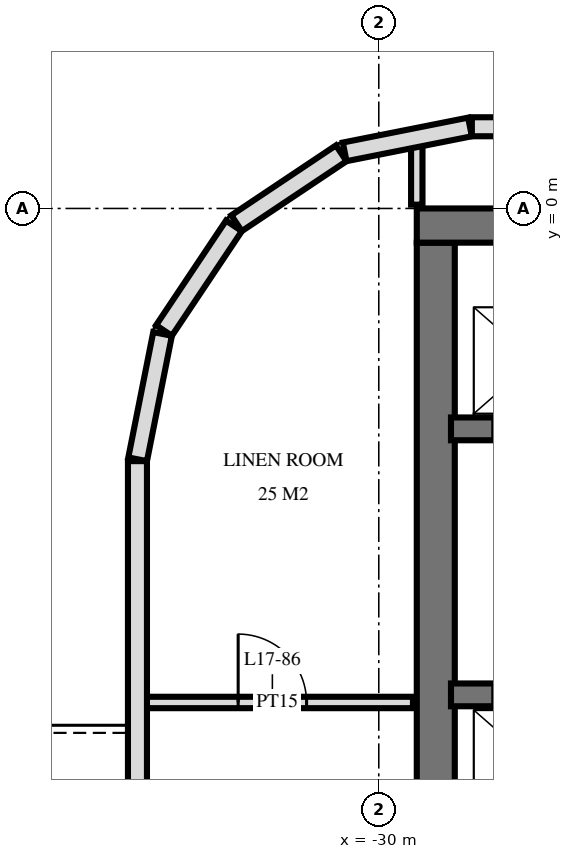
"""IFC4 building model, lengths in metres.
Left out: names, types, materials, properties, quantities, classifications, styles, units other than length and angle.
Written with IfcOpenShell. Run it as: python <this file> out.ifc"""

import sys

from ifc_helpers import new_model, si_unit, direction, frame, frame_2d, origin, place, context, subcontext, project, spatial, rectangle, extrude, element, fill, save


model = new_model("IFC4")
c1 = context("Model", 3, precision=1e-05, world=origin(), true_north=direction((0.0, 1.0)))
c2 = subcontext(c1, "Body", "Model", "MODEL_VIEW")
j1 = project(units=[si_unit("LENGTHUNIT", "METRE"), si_unit("PLANEANGLEUNIT", "RADIAN")], contexts=[c1])
p1 = place(None, origin())
s1 = spatial("IfcSite", under=j1, at=p1, CompositionType="ELEMENT")
p2 = place(p1, origin())
s2 = spatial("IfcBuilding", under=s1, at=p2, CompositionType="ELEMENT")
p3 = place(p2, frame((0.0, 0.0, 70.8)))
s3 = spatial("IfcBuildingStorey", under=s2, at=p3, CompositionType="ELEMENT", Elevation=70.8)
p4 = place(p3, frame((-29.5, -0.225, 0.0), z_axis=(0.0, 0.0, 1.0), x_axis=(1.0, 0.0, 0.0)))
e1 = element("IfcWall", 1, at=p4, inside=s3, PredefinedType="SHEAR", context=c2, shape_type="SweptSolid", body=[
    extrude(rectangle(XDim=19.5, YDim=0.45, at=frame_2d((9.75, 0.0))), origin(), (0.0, 0.0, 1.0), 3.6),
])
p5 = place(p3, frame((-29.25, -14.55, 0.0), z_axis=(0.0, 0.0, 1.0), x_axis=(0.0, 1.0, 0.0)))
e2 = element("IfcWall", 2, at=p5, inside=s3, PredefinedType="SHEAR", context=c2, shape_type="SweptSolid", body=[
    extrude(rectangle(XDim=14.1, YDim=0.5, at=frame_2d((7.05, 0.0))), origin(), (0.0, 0.0, 1.0), 3.6),
])
p6 = place(p3, frame((-29.05, -2.9, 0.0), z_axis=(0.0, 0.0, 1.0), x_axis=(1.0, 0.0, 0.0)))
e3 = element("IfcWall", 3, at=p6, inside=s3, PredefinedType="SHEAR", context=c2, shape_type="SweptSolid", body=[
    extrude(rectangle(XDim=18.7, YDim=0.3, at=frame_2d((9.35, 0.0))), origin(), (0.0, 0.0, 1.0), 3.6),
])
p7 = place(p6, frame((2.95, 0.0, 0.0)))
e4 = element("IfcOpeningElement", 4, at=p7, cuts=e3, PredefinedType="OPENING", context=c2, shape_type="SweptSolid", body=[
    extrude(rectangle(XDim=1.1, YDim=2.1, at=frame_2d((0.55, 1.05))), frame((0.0, 0.16, 0.0), z_axis=(0.0, -1.0, 0.0), x_axis=(1.0, 0.0, 0.0)), (0.0, 0.0, 1.0), 0.32),
])
p8 = place(p6, frame((0.55, 0.0, 0.0)))
e5 = element("IfcOpeningElement", 5, at=p8, cuts=e3, PredefinedType="OPENING", context=c2, shape_type="SweptSolid", body=[
    extrude(rectangle(XDim=1.1, YDim=2.1, at=frame_2d((0.55, 1.05))), frame((0.0, 0.16, 0.0), z_axis=(0.0, -1.0, 0.0), x_axis=(1.0, 0.0, 0.0)), (0.0, 0.0, 1.0), 0.32),
])
p9 = place(p6, frame((11.613, 0.0, 0.0)))
e6 = element("IfcOpeningElement", 6, at=p9, cuts=e3, PredefinedType="OPENING", context=c2, shape_type="SweptSolid", body=[
    extrude(rectangle(XDim=0.9, YDim=2.1, at=frame_2d((0.45, 1.05))), frame((0.0, 0.16, 0.0), z_axis=(0.0, -1.0, 0.0), x_axis=(1.0, 0.0, 0.0)), (0.0, 0.0, 1.0), 0.32),
])
p10 = place(p6, frame((10.188, 0.0, 0.0)))
e7 = element("IfcOpeningElement", 7, at=p10, cuts=e3, PredefinedType="OPENING", context=c2, shape_type="SweptSolid", body=[
    extrude(rectangle(XDim=0.9, YDim=2.1, at=frame_2d((0.45, 1.05))), frame((0.0, 0.16, 0.0), z_axis=(0.0, -1.0, 0.0), x_axis=(1.0, 0.0, 0.0)), (0.0, 0.0, 1.0), 0.32),
])
p11 = place(p6, frame((17.562, 0.0, 0.0)))
e8 = element("IfcOpeningElement", 8, at=p11, cuts=e3, PredefinedType="OPENING", context=c2, shape_type="SweptSolid", body=[
    extrude(rectangle(XDim=1.0, YDim=2.1, at=frame_2d((0.5, 1.05))), frame((0.0, 0.16, 0.0), z_axis=(0.0, -1.0, 0.0), x_axis=(1.0, 0.0, 0.0)), (0.0, 0.0, 1.0), 0.32),
])
p12 = place(p6, frame((16.137, 0.0, 0.0)))
e9 = element("IfcOpeningElement", 9, at=p12, cuts=e3, PredefinedType="OPENING", context=c2, shape_type="SweptSolid", body=[
    extrude(rectangle(XDim=1.0, YDim=2.1, at=frame_2d((0.5, 1.05))), frame((0.0, 0.16, 0.0), z_axis=(0.0, -1.0, 0.0), x_axis=(1.0, 0.0, 0.0)), (0.0, 0.0, 1.0), 0.32),
])
p13 = place(p6, frame((13.85, 0.0, 0.0)))
e10 = element("IfcOpeningElement", 10, at=p13, cuts=e3, PredefinedType="OPENING", context=c2, shape_type="SweptSolid", body=[
    extrude(rectangle(XDim=1.0, YDim=2.1, at=frame_2d((0.5, 1.05))), frame((0.0, 0.16, 0.0), z_axis=(0.0, -1.0, 0.0), x_axis=(1.0, 0.0, 0.0)), (0.0, 0.0, 1.0), 0.32),
])
p14 = place(p6, frame((5.6, 0.0, 0.0)))
e11 = element("IfcOpeningElement", 11, at=p14, cuts=e3, PredefinedType="OPENING", context=c2, shape_type="SweptSolid", body=[
    extrude(rectangle(XDim=1.0, YDim=2.1, at=frame_2d((0.5, 1.05))), frame((0.0, 0.16, 0.0), z_axis=(0.0, -1.0, 0.0), x_axis=(1.0, 0.0, 0.0)), (0.0, 0.0, 1.0), 0.32),
])
p15 = place(p3, frame((-29.05, -6.4, 0.0), z_axis=(0.0, 0.0, 1.0), x_axis=(1.0, 0.0, 0.0)))
e12 = element("IfcWall", 12, at=p15, inside=s3, PredefinedType="SHEAR", context=c2, shape_type="SweptSolid", body=[
    extrude(rectangle(XDim=18.7, YDim=0.3, at=frame_2d((9.35, 0.0))), origin(), (0.0, 0.0, 1.0), 3.6),
])
p16 = place(p15, frame((2.95, 0.0, 0.0)))
e13 = element("IfcOpeningElement", 13, at=p16, cuts=e12, PredefinedType="OPENING", context=c2, shape_type="SweptSolid", body=[
    extrude(rectangle(XDim=1.1, YDim=2.1, at=frame_2d((0.55, 1.05))), frame((0.0, 0.16, 0.0), z_axis=(0.0, -1.0, 0.0), x_axis=(1.0, 0.0, 0.0)), (0.0, 0.0, 1.0), 0.32),
])
p17 = place(p15, frame((0.55, 0.0, 0.0)))
e14 = element("IfcOpeningElement", 14, at=p17, cuts=e12, PredefinedType="OPENING", context=c2, shape_type="SweptSolid", body=[
    extrude(rectangle(XDim=1.1, YDim=2.1, at=frame_2d((0.55, 1.05))), frame((0.0, 0.16, 0.0), z_axis=(0.0, -1.0, 0.0), x_axis=(1.0, 0.0, 0.0)), (0.0, 0.0, 1.0), 0.32),
])
p18 = place(p15, frame((10.8, 0.0, 0.0)))
e15 = element("IfcOpeningElement", 15, at=p18, cuts=e12, PredefinedType="OPENING", context=c2, shape_type="SweptSolid", body=[
    extrude(rectangle(XDim=1.1, YDim=2.1, at=frame_2d((0.55, 1.05))), frame((0.0, 0.16, 0.0), z_axis=(0.0, -1.0, 0.0), x_axis=(1.0, 0.0, 0.0)), (0.0, 0.0, 1.0), 0.32),
])
p19 = place(p15, frame((5.6, 0.0, 0.0)))
e16 = element("IfcOpeningElement", 16, at=p19, cuts=e12, PredefinedType="OPENING", context=c2, shape_type="SweptSolid", body=[
    extrude(rectangle(XDim=1.0, YDim=2.1, at=frame_2d((0.5, 1.05))), frame((0.0, 0.16, 0.0), z_axis=(0.0, -1.0, 0.0), x_axis=(1.0, 0.0, 0.0)), (0.0, 0.0, 1.0), 0.32),
])
p20 = place(p3, frame((28.775, 1.075, 0.0), z_axis=(0.0, 0.0, 1.0), x_axis=(-1.0, 0.0, 0.0)))
e17 = element("IfcWall", 17, at=p20, inside=s3, PredefinedType="SOLIDWALL", context=c2, shape_type="SweptSolid", body=[
    extrude(rectangle(XDim=57.551, YDim=0.25, at=frame_2d((28.775, 0.0))), origin(), (0.0, 0.0, 1.0), 3.32),
])
p21 = place(p20, frame((35.575, 0.0, 0.3)))
e18 = element("IfcOpeningElement", 18, at=p21, cuts=e17, PredefinedType="OPENING", context=c2, shape_type="SweptSolid", body=[
    extrude(rectangle(XDim=2.4, YDim=2.1, at=frame_2d((1.2, 1.05))), frame((0.0, 0.135, 0.0), z_axis=(0.0, -1.0, 0.0), x_axis=(1.0, 0.0, 0.0)), (0.0, 0.0, 1.0), 0.27),
])
p22 = place(p3, frame((-28.8, 1.073, 0.0), z_axis=(0.0, 0.0, 1.0), x_axis=(-0.980803419081, -0.194999110559, 0.0)))
e19 = element("IfcWall", 19, at=p22, inside=s3, PredefinedType="SOLIDWALL", context=c2, shape_type="SweptSolid", body=[
    extrude(rectangle(XDim=1.681, YDim=0.25, at=frame_2d((0.841, 0.0))), origin(), (0.0, 0.0, 1.0), 3.32),
])
for number, where, z_axis, x_axis in (
    (20, (-30.494, 0.726, 0.0), (0.0, 0.0, 1.0), (-0.831, -0.556, 0.0)),
    (21, (-31.906, -0.229, 0.0), (0.0, 0.0, 1.0), (-0.556, -0.831, 0.0)),
):
    element("IfcWall", number, at=place(p3, frame(where, z_axis=z_axis, x_axis=x_axis)), inside=s3, PredefinedType="SOLIDWALL", context=c2, shape_type="SweptSolid", body=[
        extrude(rectangle(XDim=1.656, YDim=0.25, at=frame_2d((0.828, 0.0))), origin(), (0.0, 0.0, 1.0), 3.32),
    ])
p23 = place(p3, frame((-32.844, -1.651, 0.0), z_axis=(0.0, 0.0, 1.0), x_axis=(-0.19513878023, -0.980775640221, 0.0)))
e22 = element("IfcWall", 22, at=p23, inside=s3, PredefinedType="SOLIDWALL", context=c2, shape_type="SweptSolid", body=[
    extrude(rectangle(XDim=1.681, YDim=0.25, at=frame_2d((0.841, 0.0))), origin(), (0.0, 0.0, 1.0), 3.32),
])
p24 = place(p3, frame((-33.175, -3.325, 0.0), z_axis=(0.0, 0.0, 1.0), x_axis=(0.0, -1.0, 0.0)))
e23 = element("IfcWall", 23, at=p24, inside=s3, PredefinedType="SOLIDWALL", context=c2, shape_type="SweptSolid", body=[
    extrude(rectangle(XDim=21.551, YDim=0.25, at=frame_2d((10.775, 0.0))), origin(), (0.0, 0.0, 1.0), 3.32),
])
p25 = place(p24, frame((6.65, 0.0, 0.0)))
e24 = element("IfcOpeningElement", 24, at=p25, cuts=e23, PredefinedType="OPENING", context=c2, shape_type="SweptSolid", body=[
    extrude(rectangle(XDim=1.8, YDim=2.4, at=frame_2d((0.9, 1.2))), frame((0.0, 0.135, 0.0), z_axis=(0.0, -1.0, 0.0), x_axis=(1.0, 0.0, 0.0)), (0.0, 0.0, 1.0), 0.27),
])
p26 = place(p24, frame((12.575, 0.0, 0.3)))
e25 = element("IfcOpeningElement", 25, at=p26, cuts=e23, PredefinedType="OPENING", context=c2, shape_type="SweptSolid", body=[
    extrude(rectangle(XDim=1.2, YDim=2.1, at=frame_2d((0.6, 1.05))), frame((0.0, 0.135, 0.0), z_axis=(0.0, -1.0, 0.0), x_axis=(1.0, 0.0, 0.0)), (0.0, 0.0, 1.0), 0.27),
])
p27 = place(p24, frame((15.275, 0.0, 0.0)))
e26 = element("IfcOpeningElement", 26, at=p27, cuts=e23, PredefinedType="OPENING", context=c2, shape_type="SweptSolid", body=[
    extrude(rectangle(XDim=1.8, YDim=2.4, at=frame_2d((0.9, 1.2))), frame((0.0, 0.135, 0.0), z_axis=(0.0, -1.0, 0.0), x_axis=(1.0, 0.0, 0.0)), (0.0, 0.0, 1.0), 0.27),
])
p28 = place(p24, frame((18.875, 0.0, 0.0)))
e27 = element("IfcOpeningElement", 27, at=p28, cuts=e23, PredefinedType="OPENING", context=c2, shape_type="SweptSolid", body=[
    extrude(rectangle(XDim=1.8, YDim=2.4, at=frame_2d((0.9, 1.2))), frame((0.0, 0.135, 0.0), z_axis=(0.0, -1.0, 0.0), x_axis=(1.0, 0.0, 0.0)), (0.0, 0.0, 1.0), 0.27),
])
p29 = place(p3, frame((-29.5, 0.05, 0.0), z_axis=(0.0, 0.0, 1.0), x_axis=(0.0, 1.0, 0.0)))
e28 = element("IfcWall", 28, at=p29, inside=s3, PredefinedType="PARTITIONING", context=c2, shape_type="SweptSolid", body=[
    extrude(rectangle(XDim=0.827, YDim=0.15, at=frame_2d((0.414, 0.0))), origin(), (0.0, 0.0, 1.0), 3.32),
])
p30 = place(p3, frame((-33.12, -6.5, 0.0), z_axis=(0.0, 0.0, 1.0), x_axis=(1.0, 0.0, 0.0)))
e29 = element("IfcWall", 29, at=p30, inside=s3, PredefinedType="PARTITIONING", context=c2, shape_type="SweptSolid", body=[
    extrude(rectangle(XDim=3.57, YDim=0.15, at=frame_2d((1.785, 0.0))), origin(), (0.0, 0.0, 1.0), 3.32),
])
p31 = place(p30, frame((1.27, 0.0, 0.0)))
e30 = element("IfcOpeningElement", 30, at=p31, cuts=e29, PredefinedType="OPENING", context=c2, shape_type="SweptSolid", body=[
    extrude(rectangle(XDim=0.9, YDim=2.1, at=frame_2d((0.45, 1.05))), frame((0.0, 0.085, 0.0), z_axis=(0.0, -1.0, 0.0), x_axis=(1.0, 0.0, 0.0)), (0.0, 0.0, 1.0), 0.17),
])
p32 = place(p31, origin())
e31 = element("IfcDoor", 31, at=p32, inside=s3, OperationType="SINGLE_SWING_RIGHT", PredefinedType="DOOR", context=c2, shape_type="SweptSolid", body=[
    extrude(rectangle(XDim=0.9, YDim=2.1, at=frame_2d((0.45, 1.05))), frame((0.0, 0.025, 0.0), z_axis=(0.0, -1.0, 0.0), x_axis=(1.0, 0.0, 0.0)), (0.0, 0.0, 1.0), 0.05),
])
fill(e30, e31)
save(model, sys.argv[1])
